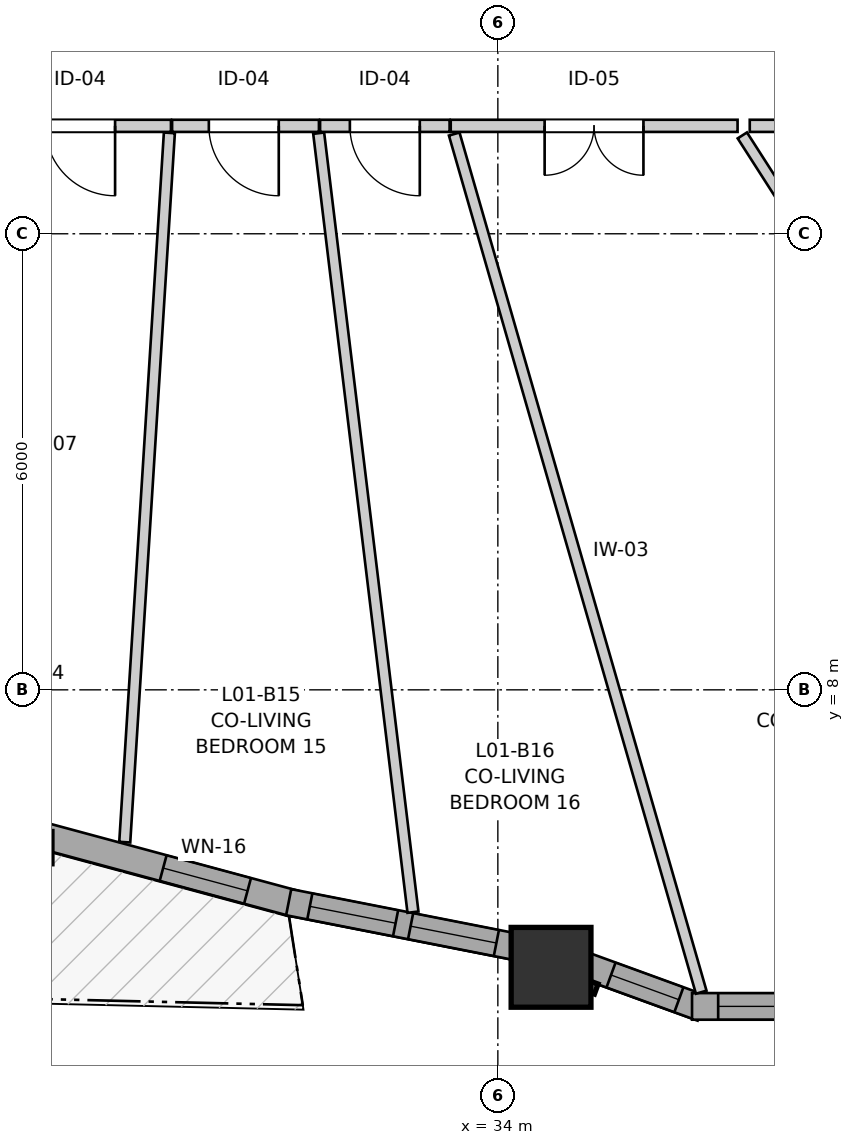
"""IFC4 building model, lengths in metres.
Left out: names, types, materials, properties, quantities, classifications, styles, units other than length and angle.
Written with IfcOpenShell. Run it as: python <this file> out.ifc"""

import sys

from ifc_helpers import new_model, si_unit, direction, frame, frame_2d, origin, origin_2d, place, context, subcontext, project, spatial, rectangle, i_section, extrude, source, transform, mapped, element, fill, save


model = new_model("IFC4")
c1 = context("Model", 3, precision=1e-05, world=origin(), true_north=direction((0.0, 1.0)))
c2 = subcontext(c1, "Body", "Model", "MODEL_VIEW")
j1 = project(units=[si_unit("LENGTHUNIT", "METRE"), si_unit("PLANEANGLEUNIT", "RADIAN")], contexts=[c1])
p1 = place(None, origin())
s1 = spatial("IfcSite", under=j1, at=p1, CompositionType="ELEMENT")
p2 = place(p1, origin())
s2 = spatial("IfcBuilding", under=s1, at=p2, CompositionType="ELEMENT")
p3 = place(p2, frame((0.0, 0.0, 7.8)))
s3 = spatial("IfcBuildingStorey", under=s2, at=p3, CompositionType="ELEMENT", Elevation=7.8)
m1 = source(origin(), c2, "Body", "SweptSolid", [
    extrude(i_section(OverallWidth=0.409, OverallDepth=0.425, WebThickness=0.03, FlangeThickness=0.048, FilletRadius=0.015, at=origin_2d()), origin(), (0.0, 0.0, 1.0), 2.94),
])
p4 = place(p3, frame((27.929, 5.924, 0.0), z_axis=(0.0, 0.0, 1.0), x_axis=(1.0, 0.0, 0.0)))
e1 = element("IfcColumn", 1, at=p4, inside=s3, PredefinedType="PILASTER", context=c2, shape_type="MappedRepresentation", body=[
    mapped(m1, transform((0.0, 0.0, 0.0), x_axis=(1.0, 0.0, 0.0), y_axis=(0.0, 1.0, 0.0), z_axis=(0.0, 0.0, 1.0), scale=1.0)),
])
m2 = source(origin(), c2, "Body", "SweptSolid", [
    extrude(rectangle(XDim=1.05, YDim=1.05, at=origin_2d()), origin(), (0.0, 0.0, 1.0), 2.94),
])
p5 = place(p3, frame((34.7, 4.349, 0.0), z_axis=(0.0, 0.0, 1.0), x_axis=(1.0, 0.0, 0.0)))
e2 = element("IfcColumn", 2, at=p5, inside=s3, PredefinedType="COLUMN", context=c2, shape_type="MappedRepresentation", body=[
    mapped(m2, transform((0.0, 0.0, 0.0), x_axis=(1.0, 0.0, 0.0), y_axis=(0.0, 1.0, 0.0), z_axis=(0.0, 0.0, 1.0), scale=1.0)),
])
p6 = place(p3, frame((27.994, 6.088, 0.0), z_axis=(0.0, 0.0, 1.0), x_axis=(0.965452701472, -0.260578359079, 0.0)))
e3 = element("IfcWall", 3, at=p6, inside=s3, PredefinedType="SOLIDWALL", context=c2, shape_type="SweptSolid", body=[
    extrude(rectangle(XDim=3.459, YDim=0.35, at=frame_2d((1.729, 0.0))), origin(), (0.0, 0.0, 1.0), 2.42),
])
p7 = place(p6, frame((1.66, 0.0, 0.82)))
e4 = element("IfcOpeningElement", 4, at=p7, cuts=e3, PredefinedType="OPENING", context=c2, shape_type="SweptSolid", body=[
    extrude(rectangle(XDim=1.15, YDim=1.2, at=frame_2d((0.575, 0.6))), frame((0.0, 0.185, 0.0), z_axis=(0.0, -1.0, 0.0), x_axis=(1.0, 0.0, 0.0)), (0.0, 0.0, 1.0), 0.37),
])
p8 = place(p3, frame((31.248, 5.206, 0.0), z_axis=(0.0, 0.0, 1.0), x_axis=(0.981233354077, -0.192824025597, 0.0)))
e5 = element("IfcWall", 5, at=p8, inside=s3, PredefinedType="SOLIDWALL", context=c2, shape_type="SweptSolid", body=[
    extrude(rectangle(XDim=3.253, YDim=0.35, at=frame_2d((1.626, 0.0))), origin(), (0.0, 0.0, 1.0), 2.42),
])
p9 = place(p8, frame((0.284, 0.0, 0.82)))
e6 = element("IfcOpeningElement", 6, at=p9, cuts=e5, PredefinedType="OPENING", context=c2, shape_type="SweptSolid", body=[
    extrude(rectangle(XDim=1.15, YDim=1.2, at=frame_2d((0.575, 0.6))), frame((0.0, 0.185, 0.0), z_axis=(0.0, -1.0, 0.0), x_axis=(1.0, 0.0, 0.0)), (0.0, 0.0, 1.0), 0.37),
])
p10 = place(p8, frame((1.635, 0.0, 0.82)))
e7 = element("IfcOpeningElement", 7, at=p10, cuts=e5, PredefinedType="OPENING", context=c2, shape_type="SweptSolid", body=[
    extrude(rectangle(XDim=1.15, YDim=1.2, at=frame_2d((0.575, 0.6))), frame((0.0, 0.185, 0.0), z_axis=(0.0, -1.0, 0.0), x_axis=(1.0, 0.0, 0.0)), (0.0, 0.0, 1.0), 0.37),
])
p11 = place(p3, frame((35.042, 4.411, 0.0), z_axis=(0.0, 0.0, 1.0), x_axis=(0.9396916908, -0.34202269843, 0.0)))
e8 = element("IfcWall", 8, at=p11, inside=s3, PredefinedType="SOLIDWALL", context=c2, shape_type="SweptSolid", body=[
    extrude(rectangle(XDim=1.752, YDim=0.35, at=frame_2d((0.876, 0.0))), origin(), (0.0, 0.0, 1.0), 2.42),
])
p12 = place(p11, frame((0.476, 0.0, 0.82)))
e9 = element("IfcOpeningElement", 9, at=p12, cuts=e8, PredefinedType="OPENING", context=c2, shape_type="SweptSolid", body=[
    extrude(rectangle(XDim=0.95, YDim=1.35, at=frame_2d((0.475, 0.675))), frame((0.0, 0.185, 0.0), z_axis=(0.0, -1.0, 0.0), x_axis=(1.0, 0.0, 0.0)), (0.0, 0.0, 1.0), 0.37),
])
p13 = place(p3, frame((36.555, 3.835, 0.0), z_axis=(0.0, 0.0, 1.0), x_axis=(1.0, 0.0, 0.0)))
e10 = element("IfcWall", 10, at=p13, inside=s3, PredefinedType="SOLIDWALL", context=c2, shape_type="SweptSolid", body=[
    extrude(rectangle(XDim=2.091, YDim=0.35, at=frame_2d((1.045, 0.0))), origin(), (0.0, 0.0, 1.0), 2.42),
])
p14 = place(p13, frame((0.344, 0.0, 0.82)))
e11 = element("IfcOpeningElement", 11, at=p14, cuts=e10, PredefinedType="OPENING", context=c2, shape_type="SweptSolid", body=[
    extrude(rectangle(XDim=1.45, YDim=1.25, at=frame_2d((0.725, 0.625))), frame((0.0, 0.185, 0.0), z_axis=(0.0, -1.0, 0.0), x_axis=(1.0, 0.0, 0.0)), (0.0, 0.0, 1.0), 0.37),
])
p15 = place(p3, frame((37.154, 15.42, 0.0), z_axis=(0.0, 0.0, 1.0), x_axis=(-1.0, 0.0, 0.0)))
e12 = element("IfcWall", 12, at=p15, inside=s3, PredefinedType="PARTITIONING", context=c2, shape_type="SweptSolid", body=[
    extrude(rectangle(XDim=3.774, YDim=0.16, at=frame_2d((1.887, 0.0))), origin(), (0.0, 0.0, 1.0), 2.94),
])
p16 = place(p15, frame((1.239, 0.0, 0.0)))
e13 = element("IfcOpeningElement", 13, at=p16, cuts=e12, PredefinedType="OPENING", context=c2, shape_type="SweptSolid", body=[
    extrude(rectangle(XDim=1.3, YDim=2.1, at=frame_2d((0.65, 1.05))), frame((0.0, 0.09, 0.0), z_axis=(0.0, -1.0, 0.0), x_axis=(1.0, 0.0, 0.0)), (0.0, 0.0, 1.0), 0.18),
])
p17 = place(p3, frame((29.699, 15.42, 0.0), z_axis=(0.0, 0.0, 1.0), x_axis=(-1.0, 0.0, 0.0)))
e14 = element("IfcWall", 14, at=p17, inside=s3, PredefinedType="PARTITIONING", context=c2, shape_type="SweptSolid", body=[
    extrude(rectangle(XDim=2.344, YDim=0.16, at=frame_2d((1.172, 0.0))), origin(), (0.0, 0.0, 1.0), 2.94),
])
p18 = place(p17, frame((0.735, 0.0, 0.0)))
e15 = element("IfcOpeningElement", 15, at=p18, cuts=e14, PredefinedType="OPENING", context=c2, shape_type="SweptSolid", body=[
    extrude(rectangle(XDim=0.92, YDim=2.1, at=frame_2d((0.46, 1.05))), frame((0.0, 0.09, 0.0), z_axis=(0.0, -1.0, 0.0), x_axis=(1.0, 0.0, 0.0)), (0.0, 0.0, 1.0), 0.18),
])
p19 = place(p3, frame((31.646, 15.42, 0.0), z_axis=(0.0, 0.0, 1.0), x_axis=(-1.0, 0.0, 0.0)))
e16 = element("IfcWall", 16, at=p19, inside=s3, PredefinedType="PARTITIONING", context=c2, shape_type="SweptSolid", body=[
    extrude(rectangle(XDim=1.932, YDim=0.16, at=frame_2d((0.966, 0.0))), origin(), (0.0, 0.0, 1.0), 2.94),
])
p20 = place(p19, frame((0.529, 0.0, 0.0)))
e17 = element("IfcOpeningElement", 17, at=p20, cuts=e16, PredefinedType="OPENING", context=c2, shape_type="SweptSolid", body=[
    extrude(rectangle(XDim=0.92, YDim=2.1, at=frame_2d((0.46, 1.05))), frame((0.0, 0.09, 0.0), z_axis=(0.0, -1.0, 0.0), x_axis=(1.0, 0.0, 0.0)), (0.0, 0.0, 1.0), 0.18),
])
p21 = place(p3, frame((33.365, 15.42, 0.0), z_axis=(0.0, 0.0, 1.0), x_axis=(-1.0, 0.0, 0.0)))
e18 = element("IfcWall", 18, at=p21, inside=s3, PredefinedType="PARTITIONING", context=c2, shape_type="SweptSolid", body=[
    extrude(rectangle(XDim=1.704, YDim=0.16, at=frame_2d((0.852, 0.0))), origin(), (0.0, 0.0, 1.0), 2.94),
])
p22 = place(p21, frame((0.392, 0.0, 0.0)))
e19 = element("IfcOpeningElement", 19, at=p22, cuts=e18, PredefinedType="OPENING", context=c2, shape_type="SweptSolid", body=[
    extrude(rectangle(XDim=0.92, YDim=2.1, at=frame_2d((0.46, 1.05))), frame((0.0, 0.09, 0.0), z_axis=(0.0, -1.0, 0.0), x_axis=(1.0, 0.0, 0.0)), (0.0, 0.0, 1.0), 0.18),
])
p23 = place(p3, frame((33.426, 15.312, 0.0), z_axis=(0.0, 0.0, 1.0), x_axis=(0.276606114731, -0.960983380342, 0.0)))
e20 = element("IfcWall", 20, at=p23, inside=s3, PredefinedType="PARTITIONING", context=c2, shape_type="SweptSolid", body=[
    extrude(rectangle(XDim=11.749, YDim=0.145, at=frame_2d((5.875, 0.0))), origin(), (0.0, 0.0, 1.0), 2.94),
])
p24 = place(p3, frame((31.643, 15.323, 0.0), z_axis=(0.0, 0.0, 1.0), x_axis=(0.120185874717, -0.992751406707, 0.0)))
e21 = element("IfcWall", 21, at=p24, inside=s3, PredefinedType="PARTITIONING", context=c2, shape_type="SweptSolid", body=[
    extrude(rectangle(XDim=10.323, YDim=0.145, at=frame_2d((5.162, 0.0))), origin(), (0.0, 0.0, 1.0), 2.94),
])
p25 = place(p3, frame((29.091, 5.996, 0.0), z_axis=(0.0, 0.0, 1.0), x_axis=(0.062797687125, 0.998026277456, 0.0)))
e22 = element("IfcWall", 22, at=p25, inside=s3, PredefinedType="PARTITIONING", context=c2, shape_type="SweptSolid", body=[
    extrude(rectangle(XDim=9.35, YDim=0.145, at=frame_2d((4.675, 0.0))), origin(), (0.0, 0.0, 1.0), 2.94),
])
p26 = place(p3, frame((37.217, 15.294, 0.0), z_axis=(0.0, 0.0, 1.0), x_axis=(0.539878709929, -0.841742822105, 0.0)))
e23 = element("IfcWall", 23, at=p26, inside=s3, PredefinedType="PARTITIONING", context=c2, shape_type="SweptSolid", body=[
    extrude(rectangle(XDim=3.694, YDim=0.145, at=frame_2d((1.847, 0.0))), origin(), (0.0, 0.0, 1.0), 2.94),
])
p27 = place(p3, frame((37.314, 15.42, 0.0), z_axis=(0.0, 0.0, 1.0), x_axis=(1.0, 0.0, 0.0)))
e24 = element("IfcWall", 24, at=p27, inside=s3, PredefinedType="PARTITIONING", context=c2, shape_type="SweptSolid", body=[
    extrude(rectangle(XDim=1.278, YDim=0.16, at=frame_2d((0.639, 0.0))), origin(), (0.0, 0.0, 1.0), 2.94),
])
m3 = source(origin(), c2, "Body", "SweptSolid", [
    extrude(rectangle(XDim=1.15, YDim=1.2, at=frame_2d((0.575, 0.6))), frame((0.0, 0.03, 0.0), z_axis=(0.0, -1.0, 0.0), x_axis=(1.0, 0.0, 0.0)), (0.0, 0.0, 1.0), 0.06),
])
p28 = place(p7, origin())
e25 = element("IfcWindow", 25, at=p28, inside=s3, PartitioningType="SINGLE_PANEL", PredefinedType="WINDOW", context=c2, shape_type="MappedRepresentation", body=[
    mapped(m3, transform((0.0, 0.0, 0.0), x_axis=(1.0, 0.0, 0.0), y_axis=(0.0, 1.0, 0.0), z_axis=(0.0, 0.0, 1.0), scale=1.0)),
])
fill(e4, e25)
p29 = place(p9, origin())
e26 = element("IfcWindow", 26, at=p29, inside=s3, PartitioningType="SINGLE_PANEL", PredefinedType="WINDOW", context=c2, shape_type="MappedRepresentation", body=[
    mapped(m3, transform((0.0, 0.0, 0.0), x_axis=(1.0, 0.0, 0.0), y_axis=(0.0, 1.0, 0.0), z_axis=(0.0, 0.0, 1.0), scale=1.0)),
])
fill(e6, e26)
p30 = place(p10, origin())
e27 = element("IfcWindow", 27, at=p30, inside=s3, PartitioningType="SINGLE_PANEL", PredefinedType="WINDOW", context=c2, shape_type="MappedRepresentation", body=[
    mapped(m3, transform((0.0, 0.0, 0.0), x_axis=(1.0, 0.0, 0.0), y_axis=(0.0, 1.0, 0.0), z_axis=(0.0, 0.0, 1.0), scale=1.0)),
])
fill(e7, e27)
m4 = source(origin(), c2, "Body", "SweptSolid", [
    extrude(rectangle(XDim=0.95, YDim=1.35, at=frame_2d((0.475, 0.675))), frame((0.0, 0.03, 0.0), z_axis=(0.0, -1.0, 0.0), x_axis=(1.0, 0.0, 0.0)), (0.0, 0.0, 1.0), 0.06),
])
p31 = place(p12, origin())
e28 = element("IfcWindow", 28, at=p31, inside=s3, PartitioningType="SINGLE_PANEL", PredefinedType="WINDOW", context=c2, shape_type="MappedRepresentation", body=[
    mapped(m4, transform((0.0, 0.0, 0.0), x_axis=(1.0, 0.0, 0.0), y_axis=(0.0, 1.0, 0.0), z_axis=(0.0, 0.0, 1.0), scale=1.0)),
])
fill(e9, e28)
m5 = source(origin(), c2, "Body", "SweptSolid", [
    extrude(rectangle(XDim=1.45, YDim=1.25, at=frame_2d((0.725, 0.625))), frame((0.0, 0.03, 0.0), z_axis=(0.0, -1.0, 0.0), x_axis=(1.0, 0.0, 0.0)), (0.0, 0.0, 1.0), 0.06),
])
p32 = place(p14, origin())
e29 = element("IfcWindow", 29, at=p32, inside=s3, PartitioningType="SINGLE_PANEL", PredefinedType="WINDOW", context=c2, shape_type="MappedRepresentation", body=[
    mapped(m5, transform((0.0, 0.0, 0.0), x_axis=(1.0, 0.0, 0.0), y_axis=(0.0, 1.0, 0.0), z_axis=(0.0, 0.0, 1.0), scale=1.0)),
])
fill(e11, e29)
m6 = source(origin(), c2, "Body", "SweptSolid", [
    extrude(rectangle(XDim=1.3, YDim=2.1, at=frame_2d((0.65, 1.05))), frame((0.0, 0.025, 0.0), z_axis=(0.0, -1.0, 0.0), x_axis=(1.0, 0.0, 0.0)), (0.0, 0.0, 1.0), 0.05),
])
p33 = place(p16, origin())
e30 = element("IfcDoor", 30, at=p33, inside=s3, OperationType="DOUBLE_DOOR_SINGLE_SWING", PredefinedType="DOOR", context=c2, shape_type="MappedRepresentation", body=[
    mapped(m6, transform((0.0, 0.0, 0.0), x_axis=(1.0, 0.0, 0.0), y_axis=(0.0, 1.0, 0.0), z_axis=(0.0, 0.0, 1.0), scale=1.0)),
])
fill(e13, e30)
m7 = source(origin(), c2, "Body", "SweptSolid", [
    extrude(rectangle(XDim=0.92, YDim=2.1, at=frame_2d((0.46, 1.05))), frame((0.0, 0.025, 0.0), z_axis=(0.0, -1.0, 0.0), x_axis=(1.0, 0.0, 0.0)), (0.0, 0.0, 1.0), 0.05),
])
p34 = place(p18, origin())
e31 = element("IfcDoor", 31, at=p34, inside=s3, OperationType="SINGLE_SWING_LEFT", PredefinedType="DOOR", context=c2, shape_type="MappedRepresentation", body=[
    mapped(m7, transform((0.0, 0.0, 0.0), x_axis=(1.0, 0.0, 0.0), y_axis=(0.0, 1.0, 0.0), z_axis=(0.0, 0.0, 1.0), scale=1.0)),
])
fill(e15, e31)
p35 = place(p20, origin())
e32 = element("IfcDoor", 32, at=p35, inside=s3, OperationType="SINGLE_SWING_LEFT", PredefinedType="DOOR", context=c2, shape_type="MappedRepresentation", body=[
    mapped(m7, transform((0.0, 0.0, 0.0), x_axis=(1.0, 0.0, 0.0), y_axis=(0.0, 1.0, 0.0), z_axis=(0.0, 0.0, 1.0), scale=1.0)),
])
fill(e17, e32)
p36 = place(p22, origin())
e33 = element("IfcDoor", 33, at=p36, inside=s3, OperationType="SINGLE_SWING_LEFT", PredefinedType="DOOR", context=c2, shape_type="MappedRepresentation", body=[
    mapped(m7, transform((0.0, 0.0, 0.0), x_axis=(1.0, 0.0, 0.0), y_axis=(0.0, 1.0, 0.0), z_axis=(0.0, 0.0, 1.0), scale=1.0)),
])
fill(e19, e33)
save(model, sys.argv[1])
